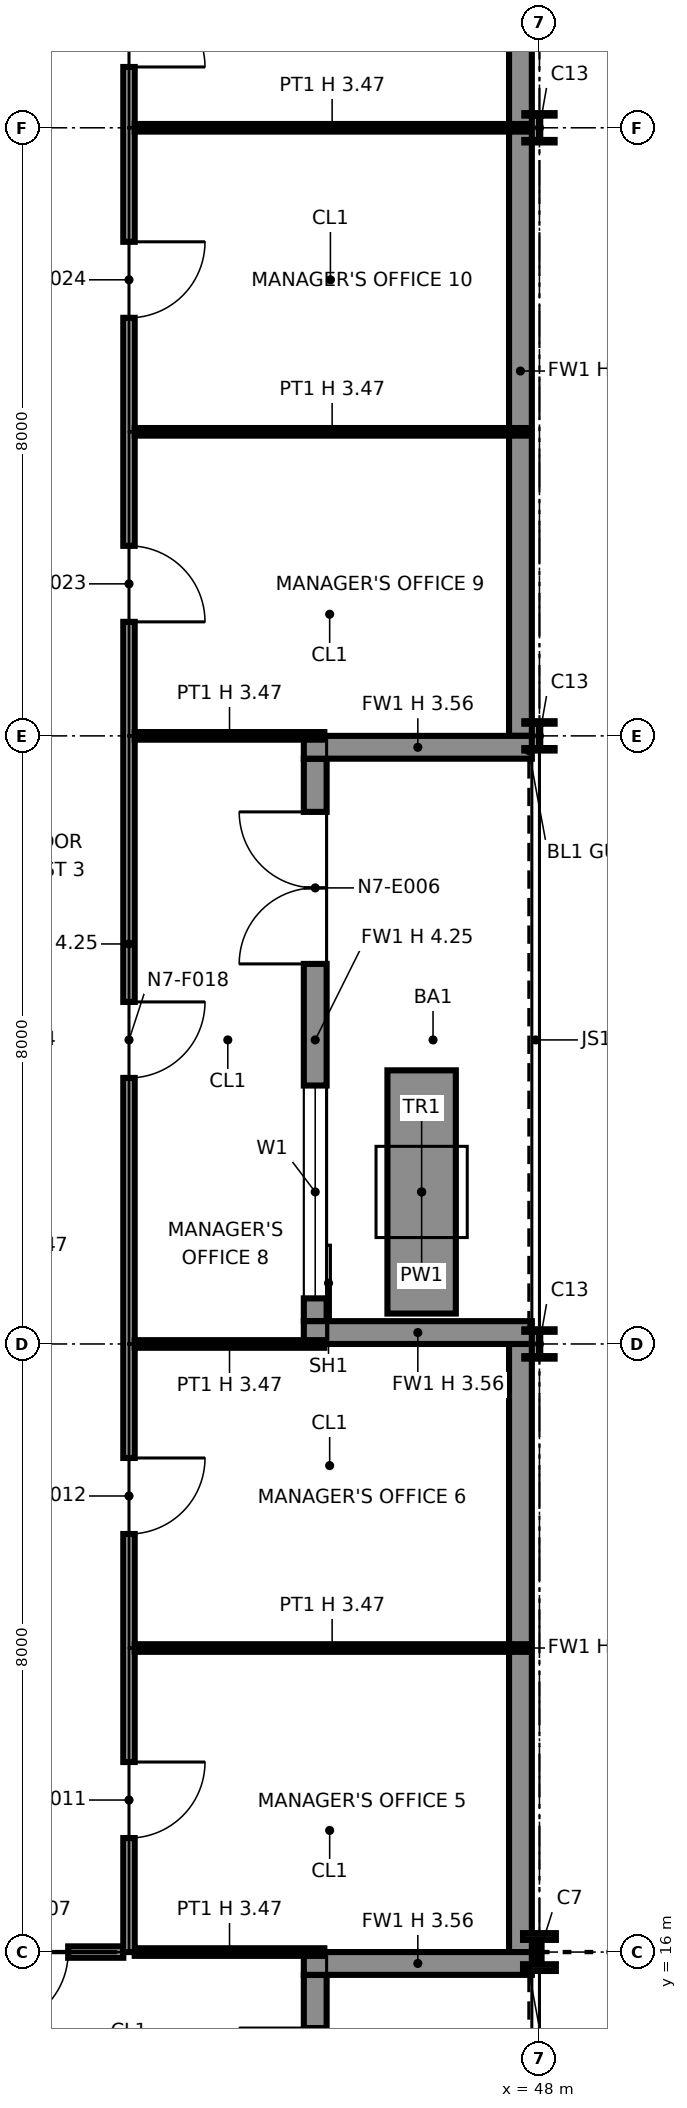
"""IFC4 building model, lengths in metres.
Left out: names, types, materials, properties, quantities, classifications, styles, units other than length and angle.
Written with IfcOpenShell. Run it as: python <this file> out.ifc"""

import sys

from ifc_helpers import new_model, si_unit, direction, frame, frame_2d, origin, origin_2d, place, context, subcontext, project, spatial, polyline, rectangle, i_section, outline, extrude, element, fill, save


model = new_model("IFC4")
c1 = context("Model", 3, precision=1e-05, world=origin(), true_north=direction((0.0, 1.0)))
c2 = subcontext(c1, "Body", "Model", "MODEL_VIEW")
j1 = project(units=[si_unit("LENGTHUNIT", "METRE"), si_unit("PLANEANGLEUNIT", "RADIAN")], contexts=[c1])
p1 = place(None, origin())
s1 = spatial("IfcSite", under=j1, at=p1, CompositionType="ELEMENT")
p2 = place(p1, origin())
s2 = spatial("IfcBuilding", under=s1, at=p2, CompositionType="ELEMENT")
p3 = place(p2, frame((0.0, 0.0, 105.2)))
s3 = spatial("IfcBuildingStorey", under=s2, at=p3, CompositionType="ELEMENT", Elevation=105.2)
p4 = place(p3, frame((48.0, 16.0, 0.0), z_axis=(0.0, 0.0, 1.0), x_axis=(1.0, 0.0, 0.0)))
e1 = element("IfcColumn", 1, at=p4, inside=s3, PredefinedType="COLUMN", context=c2, shape_type="SweptSolid", body=[
    extrude(i_section(OverallWidth=0.432, OverallDepth=0.498, WebThickness=0.056, FlangeThickness=0.089, at=origin_2d()), origin(), (0.0, 0.0, 1.0), 4.25),
])
for number, where, z_axis, x_axis in (
    (2, (48.0, 24.0, 0.0), (0.0, 0.0, 1.0), (1.0, 0.0, 0.0)),
    (3, (48.0, 32.0, 0.0), (0.0, 0.0, 1.0), (1.0, 0.0, 0.0)),
    (4, (48.0, 40.0, 0.0), (0.0, 0.0, 1.0), (1.0, 0.0, 0.0)),
):
    element("IfcColumn", number, at=place(p3, frame(where, z_axis=z_axis, x_axis=x_axis)), inside=s3, PredefinedType="COLUMN", context=c2, shape_type="SweptSolid", body=[
        extrude(i_section(OverallWidth=0.399, OverallDepth=0.386, WebThickness=0.021, FlangeThickness=0.033, at=origin_2d()), origin(), (0.0, 0.0, 1.0), 4.25),
    ])
p5 = place(p3, frame((45.05, 8.3, 0.0), z_axis=(0.0, 0.0, 1.0), x_axis=(0.0, 1.0, 0.0)))
e5 = element("IfcWall", 5, at=p5, inside=s3, PredefinedType="SOLIDWALL", context=c2, shape_type="SweptSolid", body=[
    extrude(rectangle(XDim=7.4, YDim=0.3, at=frame_2d((3.7, 0.0))), origin(), (0.0, 0.0, 1.0), 4.25),
])
p6 = place(p5, frame((0.3, 0.0, 0.9)))
e6 = element("IfcOpeningElement", 6, at=p6, cuts=e5, PredefinedType="OPENING", context=c2, shape_type="SweptSolid", body=[
    extrude(rectangle(XDim=2.8, YDim=2.2, at=frame_2d((1.4, 1.1))), frame((0.0, 0.16, 0.0), z_axis=(0.0, -1.0, 0.0), x_axis=(1.0, 0.0, 0.0)), (0.0, 0.0, 1.0), 0.32),
])
p7 = place(p5, frame((4.7, 0.0, 0.0)))
e7 = element("IfcOpeningElement", 7, at=p7, cuts=e5, PredefinedType="OPENING", context=c2, shape_type="SweptSolid", body=[
    extrude(rectangle(XDim=2.0, YDim=2.4, at=frame_2d((1.0, 1.2))), frame((0.0, 0.16, 0.0), z_axis=(0.0, -1.0, 0.0), x_axis=(1.0, 0.0, 0.0)), (0.0, 0.0, 1.0), 0.32),
])
p8 = place(p3, frame((47.9, 15.85, 0.0), z_axis=(0.0, 0.0, 1.0), x_axis=(-1.0, 0.0, 0.0)))
e8 = element("IfcWall", 8, at=p8, inside=s3, PredefinedType="SOLIDWALL", context=c2, shape_type="SweptSolid", body=[
    extrude(rectangle(XDim=3.0, YDim=0.3, at=frame_2d((1.5, 0.0))), origin(), (0.0, 0.0, 1.0), 3.556),
])
p9 = place(p3, frame((47.75, 16.0, 0.0), z_axis=(0.0, 0.0, 1.0), x_axis=(0.0, 1.0, 0.0)))
e9 = element("IfcWall", 9, at=p9, inside=s3, PredefinedType="SOLIDWALL", context=c2, shape_type="SweptSolid", body=[
    extrude(rectangle(XDim=8.0, YDim=0.3, at=frame_2d((4.0, 0.0))), origin(), (0.0, 0.0, 1.0), 4.25),
])
p10 = place(p3, frame((45.05, 24.3, 0.0), z_axis=(0.0, 0.0, 1.0), x_axis=(0.0, 1.0, 0.0)))
e10 = element("IfcWall", 10, at=p10, inside=s3, PredefinedType="SOLIDWALL", context=c2, shape_type="SweptSolid", body=[
    extrude(rectangle(XDim=7.4, YDim=0.3, at=frame_2d((3.7, 0.0))), origin(), (0.0, 0.0, 1.0), 4.25),
])
p11 = place(p10, frame((0.3, 0.0, 0.9)))
e11 = element("IfcOpeningElement", 11, at=p11, cuts=e10, PredefinedType="OPENING", context=c2, shape_type="SweptSolid", body=[
    extrude(rectangle(XDim=2.8, YDim=2.2, at=frame_2d((1.4, 1.1))), frame((0.0, 0.16, 0.0), z_axis=(0.0, -1.0, 0.0), x_axis=(1.0, 0.0, 0.0)), (0.0, 0.0, 1.0), 0.32),
])
p12 = place(p10, frame((4.7, 0.0, 0.0)))
e12 = element("IfcOpeningElement", 12, at=p12, cuts=e10, PredefinedType="OPENING", context=c2, shape_type="SweptSolid", body=[
    extrude(rectangle(XDim=2.0, YDim=2.4, at=frame_2d((1.0, 1.2))), frame((0.0, 0.16, 0.0), z_axis=(0.0, -1.0, 0.0), x_axis=(1.0, 0.0, 0.0)), (0.0, 0.0, 1.0), 0.32),
])
for number, where, z_axis, x_axis in (
    (13, (47.9, 24.15, 0.0), (0.0, 0.0, 1.0), (-1.0, 0.0, 0.0)),
    (14, (47.9, 31.85, 0.0), (0.0, 0.0, 1.0), (-1.0, 0.0, 0.0)),
):
    element("IfcWall", number, at=place(p3, frame(where, z_axis=z_axis, x_axis=x_axis)), inside=s3, PredefinedType="SOLIDWALL", context=c2, shape_type="SweptSolid", body=[
        extrude(rectangle(XDim=3.0, YDim=0.3, at=frame_2d((1.5, 0.0))), origin(), (0.0, 0.0, 1.0), 3.556),
    ])
p13 = place(p3, frame((47.75, 32.0, 0.0), z_axis=(0.0, 0.0, 1.0), x_axis=(0.0, 1.0, 0.0)))
e15 = element("IfcWall", 15, at=p13, inside=s3, PredefinedType="SOLIDWALL", context=c2, shape_type="SweptSolid", body=[
    extrude(rectangle(XDim=9.6, YDim=0.3, at=frame_2d((4.8, 0.0))), origin(), (0.0, 0.0, 1.0), 4.25),
])
p14 = place(p3, frame((46.45, 24.4, 0.0), z_axis=(0.0, 0.0, 1.0), x_axis=(0.0, 1.0, 0.0)))
e16 = element("IfcWall", 16, at=p14, inside=s3, PredefinedType="SOLIDWALL", context=c2, shape_type="SweptSolid", body=[
    extrude(rectangle(XDim=3.2, YDim=0.9, at=frame_2d((1.6, 0.0))), origin(), (0.0, 0.0, 1.0), 0.6),
])
p15 = place(p3, frame((40.03, 16.0, 0.0), z_axis=(0.0, 0.0, 1.0), x_axis=(1.0, 0.0, 0.0)))
e17 = element("IfcWall", 17, at=p15, inside=s3, PredefinedType="PARTITIONING", context=c2, shape_type="SweptSolid", body=[
    extrude(rectangle(XDim=2.495, YDim=0.15, at=frame_2d((1.248, 0.0))), origin(), (0.0, 0.0, 1.0), 3.47),
])
p16 = place(p15, frame((1.77, 0.0, 0.0), z_axis=(0.0, 0.0, 1.0), x_axis=(-1.0, 0.0, 0.0)))
e18 = element("IfcOpeningElement", 18, at=p16, cuts=e17, PredefinedType="OPENING", context=c2, shape_type="SweptSolid", body=[
    extrude(rectangle(XDim=1.0, YDim=2.1, at=frame_2d((0.5, 1.05))), frame((0.0, 0.085, 0.0), z_axis=(0.0, -1.0, 0.0), x_axis=(1.0, 0.0, 0.0)), (0.0, 0.0, 1.0), 0.17),
])
p17 = place(p3, frame((42.675, 16.0, 0.0), z_axis=(0.0, 0.0, 1.0), x_axis=(1.0, 0.0, 0.0)))
e19 = element("IfcWall", 19, at=p17, inside=s3, PredefinedType="PARTITIONING", context=c2, shape_type="SweptSolid", body=[
    extrude(rectangle(XDim=2.495, YDim=0.1, at=frame_2d((1.248, 0.0))), origin(), (0.0, 0.0, 1.0), 3.47),
])
p18 = place(p3, frame((42.6, 16.0, 0.0), z_axis=(0.0, 0.0, 1.0), x_axis=(0.0, 1.0, 0.0)))
e20 = element("IfcWall", 20, at=p18, inside=s3, PredefinedType="PARTITIONING", context=c2, shape_type="SweptSolid", body=[
    extrude(outline(polyline([(0.0, 0.0), (26.525, 0.0), (26.525, 4.25), (24.3, 4.25), (24.298, 3.47), (23.702, 3.47), (23.7, 4.25), (20.3, 4.25), (20.298, 3.47), (19.702, 3.47), (19.7, 4.25), (16.3, 4.25), (16.298, 3.47), (15.702, 3.47), (15.7, 4.25), (12.3, 4.25), (12.298, 3.47), (11.702, 3.47), (11.7, 4.25), (8.3, 4.25), (8.298, 3.47), (7.702, 3.47), (7.7, 4.25), (4.3, 4.25), (4.298, 3.47), (3.702, 3.47), (3.7, 4.25), (0.0, 4.25), (0.0, 0.0)])), frame((0.0, 0.075, 0.0), z_axis=(0.0, -1.0, 0.0), x_axis=(1.0, 0.0, 0.0)), (0.0, 0.0, 1.0), 0.15),
])
p19 = place(p18, frame((2.5, 0.0, 0.0), z_axis=(0.0, 0.0, 1.0), x_axis=(-1.0, 0.0, 0.0)))
e21 = element("IfcOpeningElement", 21, at=p19, cuts=e20, PredefinedType="OPENING", context=c2, shape_type="SweptSolid", body=[
    extrude(rectangle(XDim=1.0, YDim=2.1, at=frame_2d((0.5, 1.05))), frame((0.0, 0.085, 0.0), z_axis=(0.0, -1.0, 0.0), x_axis=(1.0, 0.0, 0.0)), (0.0, 0.0, 1.0), 0.17),
])
p20 = place(p18, frame((6.5, 0.0, 0.0), z_axis=(0.0, 0.0, 1.0), x_axis=(-1.0, 0.0, 0.0)))
e22 = element("IfcOpeningElement", 22, at=p20, cuts=e20, PredefinedType="OPENING", context=c2, shape_type="SweptSolid", body=[
    extrude(rectangle(XDim=1.0, YDim=2.1, at=frame_2d((0.5, 1.05))), frame((0.0, 0.085, 0.0), z_axis=(0.0, -1.0, 0.0), x_axis=(1.0, 0.0, 0.0)), (0.0, 0.0, 1.0), 0.17),
])
p21 = place(p18, frame((12.5, 0.0, 0.0), z_axis=(0.0, 0.0, 1.0), x_axis=(-1.0, 0.0, 0.0)))
e23 = element("IfcOpeningElement", 23, at=p21, cuts=e20, PredefinedType="OPENING", context=c2, shape_type="SweptSolid", body=[
    extrude(rectangle(XDim=1.0, YDim=2.1, at=frame_2d((0.5, 1.05))), frame((0.0, 0.085, 0.0), z_axis=(0.0, -1.0, 0.0), x_axis=(1.0, 0.0, 0.0)), (0.0, 0.0, 1.0), 0.17),
])
p22 = place(p18, frame((18.5, 0.0, 0.0), z_axis=(0.0, 0.0, 1.0), x_axis=(-1.0, 0.0, 0.0)))
e24 = element("IfcOpeningElement", 24, at=p22, cuts=e20, PredefinedType="OPENING", context=c2, shape_type="SweptSolid", body=[
    extrude(rectangle(XDim=1.0, YDim=2.1, at=frame_2d((0.5, 1.05))), frame((0.0, 0.085, 0.0), z_axis=(0.0, -1.0, 0.0), x_axis=(1.0, 0.0, 0.0)), (0.0, 0.0, 1.0), 0.17),
])
p23 = place(p18, frame((22.5, 0.0, 0.0), z_axis=(0.0, 0.0, 1.0), x_axis=(-1.0, 0.0, 0.0)))
e25 = element("IfcOpeningElement", 25, at=p23, cuts=e20, PredefinedType="OPENING", context=c2, shape_type="SweptSolid", body=[
    extrude(rectangle(XDim=1.0, YDim=2.1, at=frame_2d((0.5, 1.05))), frame((0.0, 0.085, 0.0), z_axis=(0.0, -1.0, 0.0), x_axis=(1.0, 0.0, 0.0)), (0.0, 0.0, 1.0), 0.17),
])
p24 = place(p18, frame((25.8, 0.0, 0.0), z_axis=(0.0, 0.0, 1.0), x_axis=(-1.0, 0.0, 0.0)))
e26 = element("IfcOpeningElement", 26, at=p24, cuts=e20, PredefinedType="OPENING", context=c2, shape_type="SweptSolid", body=[
    extrude(rectangle(XDim=1.0, YDim=2.1, at=frame_2d((0.5, 1.05))), frame((0.0, 0.085, 0.0), z_axis=(0.0, -1.0, 0.0), x_axis=(1.0, 0.0, 0.0)), (0.0, 0.0, 1.0), 0.17),
])
p25 = place(p3, frame((42.675, 20.0, 0.0), z_axis=(0.0, 0.0, 1.0), x_axis=(1.0, 0.0, 0.0)))
e27 = element("IfcWall", 27, at=p25, inside=s3, PredefinedType="PARTITIONING", context=c2, shape_type="SweptSolid", body=[
    extrude(rectangle(XDim=5.195, YDim=0.1, at=frame_2d((2.598, 0.0))), origin(), (0.0, 0.0, 1.0), 3.47),
])
for number, where, z_axis, x_axis in (
    (28, (42.675, 24.0, 0.0), (0.0, 0.0, 1.0), (1.0, 0.0, 0.0)),
    (29, (42.675, 32.0, 0.0), (0.0, 0.0, 1.0), (1.0, 0.0, 0.0)),
):
    element("IfcWall", number, at=place(p3, frame(where, z_axis=z_axis, x_axis=x_axis)), inside=s3, PredefinedType="PARTITIONING", context=c2, shape_type="SweptSolid", body=[
        extrude(rectangle(XDim=2.495, YDim=0.1, at=frame_2d((1.248, 0.0))), origin(), (0.0, 0.0, 1.0), 3.47),
    ])
for number, where, z_axis, x_axis in (
    (30, (42.675, 36.0, 0.0), (0.0, 0.0, 1.0), (1.0, 0.0, 0.0)),
    (31, (42.675, 40.0, 0.0), (0.0, 0.0, 1.0), (1.0, 0.0, 0.0)),
):
    element("IfcWall", number, at=place(p3, frame(where, z_axis=z_axis, x_axis=x_axis)), inside=s3, PredefinedType="PARTITIONING", context=c2, shape_type="SweptSolid", body=[
        extrude(rectangle(XDim=5.195, YDim=0.1, at=frame_2d((2.598, 0.0))), origin(), (0.0, 0.0, 1.0), 3.47),
    ])
p26 = place(p11, origin())
e32 = element("IfcWindow", 32, at=p26, inside=s3, PartitioningType="SINGLE_PANEL", PredefinedType="WINDOW", context=c2, shape_type="SweptSolid", body=[
    extrude(rectangle(XDim=2.8, YDim=2.2, at=frame_2d((1.4, 1.1))), frame((0.0, 0.03, 0.0), z_axis=(0.0, -1.0, 0.0), x_axis=(1.0, 0.0, 0.0)), (0.0, 0.0, 1.0), 0.06),
])
fill(e11, e32)
p27 = place(p12, origin())
e33 = element("IfcDoor", 33, at=p27, inside=s3, OperationType="DOUBLE_DOOR_SINGLE_SWING", PredefinedType="DOOR", context=c2, shape_type="SweptSolid", body=[
    extrude(rectangle(XDim=2.0, YDim=2.4, at=frame_2d((1.0, 1.2))), frame((0.0, 0.025, 0.0), z_axis=(0.0, -1.0, 0.0), x_axis=(1.0, 0.0, 0.0)), (0.0, 0.0, 1.0), 0.05),
])
fill(e12, e33)
p28 = place(p16, origin())
e34 = element("IfcDoor", 34, at=p28, inside=s3, OperationType="SINGLE_SWING_RIGHT", PredefinedType="DOOR", context=c2, shape_type="SweptSolid", body=[
    extrude(rectangle(XDim=1.0, YDim=2.1, at=frame_2d((0.5, 1.05))), frame((0.0, 0.025, 0.0), z_axis=(0.0, -1.0, 0.0), x_axis=(1.0, 0.0, 0.0)), (0.0, 0.0, 1.0), 0.05),
])
fill(e18, e34)
p29 = place(p19, origin())
e35 = element("IfcDoor", 35, at=p29, inside=s3, OperationType="SINGLE_SWING_LEFT", PredefinedType="DOOR", context=c2, shape_type="SweptSolid", body=[
    extrude(rectangle(XDim=1.0, YDim=2.1, at=frame_2d((0.5, 1.05))), frame((0.0, 0.025, 0.0), z_axis=(0.0, -1.0, 0.0), x_axis=(1.0, 0.0, 0.0)), (0.0, 0.0, 1.0), 0.05),
])
fill(e21, e35)
p30 = place(p20, origin())
e36 = element("IfcDoor", 36, at=p30, inside=s3, OperationType="SINGLE_SWING_LEFT", PredefinedType="DOOR", context=c2, shape_type="SweptSolid", body=[
    extrude(rectangle(XDim=1.0, YDim=2.1, at=frame_2d((0.5, 1.05))), frame((0.0, 0.025, 0.0), z_axis=(0.0, -1.0, 0.0), x_axis=(1.0, 0.0, 0.0)), (0.0, 0.0, 1.0), 0.05),
])
fill(e22, e36)
p31 = place(p21, origin())
e37 = element("IfcDoor", 37, at=p31, inside=s3, OperationType="SINGLE_SWING_LEFT", PredefinedType="DOOR", context=c2, shape_type="SweptSolid", body=[
    extrude(rectangle(XDim=1.0, YDim=2.1, at=frame_2d((0.5, 1.05))), frame((0.0, 0.025, 0.0), z_axis=(0.0, -1.0, 0.0), x_axis=(1.0, 0.0, 0.0)), (0.0, 0.0, 1.0), 0.05),
])
fill(e23, e37)
p32 = place(p22, origin())
e38 = element("IfcDoor", 38, at=p32, inside=s3, OperationType="SINGLE_SWING_RIGHT", PredefinedType="DOOR", context=c2, shape_type="SweptSolid", body=[
    extrude(rectangle(XDim=1.0, YDim=2.1, at=frame_2d((0.5, 1.05))), frame((0.0, 0.025, 0.0), z_axis=(0.0, -1.0, 0.0), x_axis=(1.0, 0.0, 0.0)), (0.0, 0.0, 1.0), 0.05),
])
fill(e24, e38)
p33 = place(p23, origin())
e39 = element("IfcDoor", 39, at=p33, inside=s3, OperationType="SINGLE_SWING_LEFT", PredefinedType="DOOR", context=c2, shape_type="SweptSolid", body=[
    extrude(rectangle(XDim=1.0, YDim=2.1, at=frame_2d((0.5, 1.05))), frame((0.0, 0.025, 0.0), z_axis=(0.0, -1.0, 0.0), x_axis=(1.0, 0.0, 0.0)), (0.0, 0.0, 1.0), 0.05),
])
fill(e25, e39)
p34 = place(p24, origin())
e40 = element("IfcDoor", 40, at=p34, inside=s3, OperationType="SINGLE_SWING_RIGHT", PredefinedType="DOOR", context=c2, shape_type="SweptSolid", body=[
    extrude(rectangle(XDim=1.0, YDim=2.1, at=frame_2d((0.5, 1.05))), frame((0.0, 0.025, 0.0), z_axis=(0.0, -1.0, 0.0), x_axis=(1.0, 0.0, 0.0)), (0.0, 0.0, 1.0), 0.05),
])
fill(e26, e40)
save(model, sys.argv[1])
